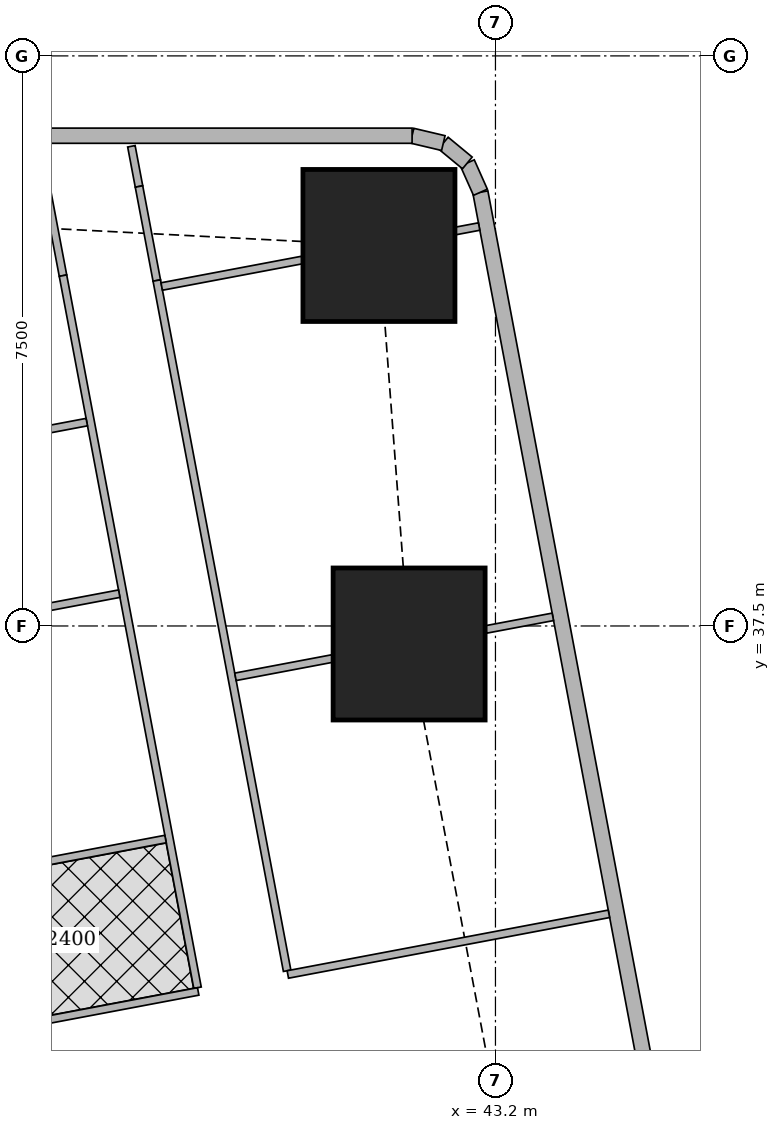
"""IFC4 building model, lengths in metres.
Left out: names, types, materials, properties, quantities, classifications, styles, units other than length and angle.
Written with IfcOpenShell. Run it as: python <this file> out.ifc"""

import sys

from ifc_helpers import new_model, si_unit, direction, frame, frame_2d, origin, origin_2d, place, context, subcontext, project, spatial, rectangle, extrude, element, fill, save


model = new_model("IFC4")
c1 = context("Model", 3, precision=1e-05, world=origin(), true_north=direction((0.0, 1.0)))
c2 = subcontext(c1, "Body", "Model", "MODEL_VIEW")
j1 = project(units=[si_unit("LENGTHUNIT", "METRE"), si_unit("PLANEANGLEUNIT", "RADIAN")], contexts=[c1])
p1 = place(None, origin())
s1 = spatial("IfcSite", under=j1, at=p1, CompositionType="ELEMENT")
p2 = place(p1, origin())
s2 = spatial("IfcBuilding", under=s1, at=p2, CompositionType="ELEMENT")
p3 = place(p2, frame((0.0, 0.0, 274.1)))
s3 = spatial("IfcBuildingStorey", under=s2, at=p3, CompositionType="ELEMENT", Elevation=274.1)
for number, where, z_axis, x_axis in (
    (1, (42.064, 37.263, 0.0), (0.0, 0.0, 1.0), (1.0, 0.0, 0.0)),
    (2, (41.667, 42.506, 0.0), (0.0, 0.0, 1.0), (1.0, 0.0, 0.0)),
):
    element("IfcColumn", number, at=place(p3, frame(where, z_axis=z_axis, x_axis=x_axis)), inside=s3, PredefinedType="COLUMN", context=c2, shape_type="SweptSolid", body=[
        extrude(rectangle(XDim=2.0, YDim=2.0, at=origin_2d()), origin(), (0.0, 0.0, 1.0), 3.75),
    ])
p4 = place(p3, frame((49.684, 7.832, 0.0), z_axis=(0.0, 0.0, 1.0), x_axis=(-0.185616669694, 0.982622232565, 0.0)))
e3 = element("IfcWall", 3, at=p4, inside=s3, PredefinedType="SOLIDWALL", context=c2, shape_type="SweptSolid", body=[
    extrude(rectangle(XDim=36.0, YDim=0.2, at=frame_2d((18.0, 0.0))), origin(), (0.0, 0.0, 1.0), 3.5),
])
p5 = place(p4, frame((2.518, 0.0, 0.9)))
e4 = element("IfcOpeningElement", 4, at=p5, cuts=e3, PredefinedType="OPENING", context=c2, shape_type="SweptSolid", body=[
    extrude(rectangle(XDim=2.4, YDim=1.5, at=frame_2d((1.2, 0.75))), frame((0.0, 0.11, 0.0), z_axis=(0.0, -1.0, 0.0), x_axis=(1.0, 0.0, 0.0)), (0.0, 0.0, 1.0), 0.22),
])
p6 = place(p4, frame((8.444, 0.0, 0.9)))
e5 = element("IfcOpeningElement", 5, at=p6, cuts=e3, PredefinedType="OPENING", context=c2, shape_type="SweptSolid", body=[
    extrude(rectangle(XDim=1.8, YDim=1.5, at=frame_2d((0.9, 0.75))), frame((0.0, 0.11, 0.0), z_axis=(0.0, -1.0, 0.0), x_axis=(1.0, 0.0, 0.0)), (0.0, 0.0, 1.0), 0.22),
])
p7 = place(p4, frame((12.261, 0.0, 0.9)))
e6 = element("IfcOpeningElement", 6, at=p7, cuts=e3, PredefinedType="OPENING", context=c2, shape_type="SweptSolid", body=[
    extrude(rectangle(XDim=1.8, YDim=1.5, at=frame_2d((0.9, 0.75))), frame((0.0, 0.11, 0.0), z_axis=(0.0, -1.0, 0.0), x_axis=(1.0, 0.0, 0.0)), (0.0, 0.0, 1.0), 0.22),
])
p8 = place(p4, frame((16.078, 0.0, 0.9)))
e7 = element("IfcOpeningElement", 7, at=p8, cuts=e3, PredefinedType="OPENING", context=c2, shape_type="SweptSolid", body=[
    extrude(rectangle(XDim=1.8, YDim=1.5, at=frame_2d((0.9, 0.75))), frame((0.0, 0.11, 0.0), z_axis=(0.0, -1.0, 0.0), x_axis=(1.0, 0.0, 0.0)), (0.0, 0.0, 1.0), 0.22),
])
p9 = place(p4, frame((19.894, 0.0, 0.9)))
e8 = element("IfcOpeningElement", 8, at=p9, cuts=e3, PredefinedType="OPENING", context=c2, shape_type="SweptSolid", body=[
    extrude(rectangle(XDim=1.8, YDim=1.5, at=frame_2d((0.9, 0.75))), frame((0.0, 0.11, 0.0), z_axis=(0.0, -1.0, 0.0), x_axis=(1.0, 0.0, 0.0)), (0.0, 0.0, 1.0), 0.22),
])
p10 = place(p4, frame((23.71, 0.0, 0.9)))
e9 = element("IfcOpeningElement", 9, at=p10, cuts=e3, PredefinedType="OPENING", context=c2, shape_type="SweptSolid", body=[
    extrude(rectangle(XDim=1.8, YDim=1.5, at=frame_2d((0.9, 0.75))), frame((0.0, 0.11, 0.0), z_axis=(0.0, -1.0, 0.0), x_axis=(1.0, 0.0, 0.0)), (0.0, 0.0, 1.0), 0.22),
])
p11 = place(p4, frame((27.526, 0.0, 0.9)))
e10 = element("IfcOpeningElement", 10, at=p11, cuts=e3, PredefinedType="OPENING", context=c2, shape_type="SweptSolid", body=[
    extrude(rectangle(XDim=1.8, YDim=1.5, at=frame_2d((0.9, 0.75))), frame((0.0, 0.11, 0.0), z_axis=(0.0, -1.0, 0.0), x_axis=(1.0, 0.0, 0.0)), (0.0, 0.0, 1.0), 0.22),
])
p12 = place(p4, frame((32.046, 0.0, 0.9)))
e11 = element("IfcOpeningElement", 11, at=p12, cuts=e3, PredefinedType="OPENING", context=c2, shape_type="SweptSolid", body=[
    extrude(rectangle(XDim=1.8, YDim=1.5, at=frame_2d((0.9, 0.75))), frame((0.0, 0.11, 0.0), z_axis=(0.0, -1.0, 0.0), x_axis=(1.0, 0.0, 0.0)), (0.0, 0.0, 1.0), 0.22),
])
p13 = place(p3, frame((43.002, 43.206, 0.0), z_axis=(0.0, 0.0, 1.0), x_axis=(-0.40678170573, 0.913525393124, 0.0)))
e12 = element("IfcWall", 12, at=p13, inside=s3, PredefinedType="SOLIDWALL", context=c2, shape_type="SweptSolid", body=[
    extrude(rectangle(XDim=0.423, YDim=0.2, at=frame_2d((0.211, 0.0))), origin(), (0.0, 0.0, 1.0), 3.5),
])
p14 = place(p3, frame((42.83, 43.592, 0.0), z_axis=(0.0, 0.0, 1.0), x_axis=(-0.771190539797, 0.636604391539, 0.0)))
e13 = element("IfcWall", 13, at=p14, inside=s3, PredefinedType="SOLIDWALL", context=c2, shape_type="SweptSolid", body=[
    extrude(rectangle(XDim=0.41, YDim=0.2, at=frame_2d((0.205, 0.0))), origin(), (0.0, 0.0, 1.0), 3.5),
])
p15 = place(p3, frame((42.514, 43.853, 0.0), z_axis=(0.0, 0.0, 1.0), x_axis=(-0.973288080424, 0.229587265555, 0.0)))
e14 = element("IfcWall", 14, at=p15, inside=s3, PredefinedType="SOLIDWALL", context=c2, shape_type="SweptSolid", body=[
    extrude(rectangle(XDim=0.422, YDim=0.2, at=frame_2d((0.211, 0.0))), origin(), (0.0, 0.0, 1.0), 3.5),
])
p16 = place(p3, frame((42.103, 43.95, 0.0), z_axis=(0.0, 0.0, 1.0), x_axis=(-1.0, 0.0, 0.0)))
e15 = element("IfcWall", 15, at=p16, inside=s3, PredefinedType="SOLIDWALL", context=c2, shape_type="SweptSolid", body=[
    extrude(rectangle(XDim=27.54, YDim=0.2, at=frame_2d((13.77, 0.0))), origin(), (0.0, 0.0, 1.0), 3.5),
])
p17 = place(p16, frame((10.603, 0.0, 0.9)))
e16 = element("IfcOpeningElement", 16, at=p17, cuts=e15, PredefinedType="OPENING", context=c2, shape_type="SweptSolid", body=[
    extrude(rectangle(XDim=1.8, YDim=1.5, at=frame_2d((0.9, 0.75))), frame((0.0, 0.11, 0.0), z_axis=(0.0, -1.0, 0.0), x_axis=(1.0, 0.0, 0.0)), (0.0, 0.0, 1.0), 0.22),
])
p18 = place(p16, frame((14.203, 0.0, 0.9)))
e17 = element("IfcOpeningElement", 17, at=p18, cuts=e15, PredefinedType="OPENING", context=c2, shape_type="SweptSolid", body=[
    extrude(rectangle(XDim=1.8, YDim=1.5, at=frame_2d((0.9, 0.75))), frame((0.0, 0.11, 0.0), z_axis=(0.0, -1.0, 0.0), x_axis=(1.0, 0.0, 0.0)), (0.0, 0.0, 1.0), 0.22),
])
p19 = place(p16, frame((17.803, 0.0, 0.9)))
e18 = element("IfcOpeningElement", 18, at=p19, cuts=e15, PredefinedType="OPENING", context=c2, shape_type="SweptSolid", body=[
    extrude(rectangle(XDim=1.8, YDim=1.5, at=frame_2d((0.9, 0.75))), frame((0.0, 0.11, 0.0), z_axis=(0.0, -1.0, 0.0), x_axis=(1.0, 0.0, 0.0)), (0.0, 0.0, 1.0), 0.22),
])
p20 = place(p16, frame((22.822, 0.0, 0.9)))
e19 = element("IfcOpeningElement", 19, at=p20, cuts=e15, PredefinedType="OPENING", context=c2, shape_type="SweptSolid", body=[
    extrude(rectangle(XDim=2.4, YDim=1.5, at=frame_2d((1.2, 0.75))), frame((0.0, 0.11, 0.0), z_axis=(0.0, -1.0, 0.0), x_axis=(1.0, 0.0, 0.0)), (0.0, 0.0, 1.0), 0.22),
])
p21 = place(p3, frame((33.781, 42.186, 0.0), z_axis=(0.0, 0.0, 1.0), x_axis=(0.185593518645, -0.9826266055, 0.0)))
e20 = element("IfcWall", 20, at=p21, inside=s3, PredefinedType="SOLIDWALL", context=c2, shape_type="SweptSolid", body=[
    extrude(rectangle(XDim=35.961, YDim=0.15, at=frame_2d((17.98, 0.0))), origin(), (0.0, 0.0, 1.0), 2.5),
])
p22 = place(p21, frame((11.76, 0.0, 0.0)))
e21 = element("IfcOpeningElement", 21, at=p22, cuts=e20, PredefinedType="OPENING", context=c2, shape_type="SweptSolid", body=[
    extrude(rectangle(XDim=1.0, YDim=2.1, at=frame_2d((0.5, 1.05))), frame((0.0, 0.085, 0.0), z_axis=(0.0, -1.0, 0.0), x_axis=(1.0, 0.0, 0.0)), (0.0, 0.0, 1.0), 0.17),
])
p23 = place(p21, frame((15.576, 0.0, 0.0)))
e22 = element("IfcOpeningElement", 22, at=p23, cuts=e20, PredefinedType="OPENING", context=c2, shape_type="SweptSolid", body=[
    extrude(rectangle(XDim=1.0, YDim=2.1, at=frame_2d((0.5, 1.05))), frame((0.0, 0.085, 0.0), z_axis=(0.0, -1.0, 0.0), x_axis=(1.0, 0.0, 0.0)), (0.0, 0.0, 1.0), 0.17),
])
p24 = place(p21, frame((30.502, 0.0, 0.0)))
e23 = element("IfcOpeningElement", 23, at=p24, cuts=e20, PredefinedType="OPENING", context=c2, shape_type="SweptSolid", body=[
    extrude(rectangle(XDim=1.0, YDim=2.1, at=frame_2d((0.5, 1.05))), frame((0.0, 0.085, 0.0), z_axis=(0.0, -1.0, 0.0), x_axis=(1.0, 0.0, 0.0)), (0.0, 0.0, 1.0), 0.17),
])
p25 = place(p3, frame((38.41, 43.811, 0.0), z_axis=(0.0, 0.0, 1.0), x_axis=(0.185903499302, -0.982568007289, 0.0)))
e24 = element("IfcWall", 24, at=p25, inside=s3, PredefinedType="PARTITIONING", context=c2, shape_type="SweptSolid", body=[
    extrude(rectangle(XDim=0.538, YDim=0.1, at=frame_2d((0.269, 0.0))), origin(), (0.0, 0.0, 1.0), 3.5),
])
p26 = place(p3, frame((38.51, 43.282, 0.0), z_axis=(0.0, 0.0, 1.0), x_axis=(0.185775287495, -0.982592256511, 0.0)))
e25 = element("IfcWall", 25, at=p26, inside=s3, PredefinedType="PARTITIONING", context=c2, shape_type="SweptSolid", body=[
    extrude(rectangle(XDim=1.259, YDim=0.1, at=frame_2d((0.629, 0.0))), origin(), (0.0, 0.0, 1.0), 2.05),
])
p27 = place(p26, frame((0.15, 0.0, 0.0)))
e26 = element("IfcOpeningElement", 26, at=p27, cuts=e25, PredefinedType="OPENING", context=c2, shape_type="SweptSolid", body=[
    extrude(rectangle(XDim=0.9, YDim=2.0, at=frame_2d((0.45, 1.0))), frame((0.0, 0.06, 0.0), z_axis=(0.0, -1.0, 0.0), x_axis=(1.0, 0.0, 0.0)), (0.0, 0.0, 1.0), 0.12),
])
p28 = place(p3, frame((38.744, 42.045, 0.0), z_axis=(0.0, 0.0, 1.0), x_axis=(0.185588352162, -0.982627581305, 0.0)))
e27 = element("IfcWall", 27, at=p28, inside=s3, PredefinedType="PARTITIONING", context=c2, shape_type="SweptSolid", body=[
    extrude(rectangle(XDim=9.241, YDim=0.1, at=frame_2d((4.621, 0.0))), origin(), (0.0, 0.0, 1.0), 3.5),
])
p29 = place(p28, frame((8.191, 0.0, 0.0)))
e28 = element("IfcOpeningElement", 28, at=p29, cuts=e27, PredefinedType="OPENING", context=c2, shape_type="SweptSolid", body=[
    extrude(rectangle(XDim=0.9, YDim=2.1, at=frame_2d((0.45, 1.05))), frame((0.0, 0.06, 0.0), z_axis=(0.0, -1.0, 0.0), x_axis=(1.0, 0.0, 0.0)), (0.0, 0.0, 1.0), 0.12),
])
p30 = place(p28, frame((4.215, 0.0, 0.0)))
e29 = element("IfcOpeningElement", 29, at=p30, cuts=e27, PredefinedType="OPENING", context=c2, shape_type="SweptSolid", body=[
    extrude(rectangle(XDim=0.9, YDim=2.1, at=frame_2d((0.45, 1.05))), frame((0.0, 0.06, 0.0), z_axis=(0.0, -1.0, 0.0), x_axis=(1.0, 0.0, 0.0)), (0.0, 0.0, 1.0), 0.12),
])
p31 = place(p3, frame((37.276, 43.346, 0.0), z_axis=(0.0, 0.0, 1.0), x_axis=(0.185962504646, -0.982556841544, 0.0)))
e30 = element("IfcWall", 30, at=p31, inside=s3, PredefinedType="PARTITIONING", context=c2, shape_type="SweptSolid", body=[
    extrude(rectangle(XDim=1.259, YDim=0.1, at=frame_2d((0.629, 0.0))), origin(), (0.0, 0.0, 1.0), 2.05),
])
p32 = place(p3, frame((37.51, 42.109, 0.0), z_axis=(0.0, 0.0, 1.0), x_axis=(0.185659798122, -0.982614084654, 0.0)))
e31 = element("IfcWall", 31, at=p32, inside=s3, PredefinedType="PARTITIONING", context=c2, shape_type="SweptSolid", body=[
    extrude(rectangle(XDim=9.534, YDim=0.1, at=frame_2d((4.767, 0.0))), origin(), (0.0, 0.0, 1.0), 3.5),
])
p33 = place(p32, frame((8.109, 0.0, 0.0)))
e32 = element("IfcOpeningElement", 32, at=p33, cuts=e31, PredefinedType="OPENING", context=c2, shape_type="SweptSolid", body=[
    extrude(rectangle(XDim=0.9, YDim=2.1, at=frame_2d((0.45, 1.05))), frame((0.0, 0.06, 0.0), z_axis=(0.0, -1.0, 0.0), x_axis=(1.0, 0.0, 0.0)), (0.0, 0.0, 1.0), 0.12),
])
p34 = place(p32, frame((2.65, 0.0, 0.0)))
e33 = element("IfcOpeningElement", 33, at=p34, cuts=e31, PredefinedType="OPENING", context=c2, shape_type="SweptSolid", body=[
    extrude(rectangle(XDim=0.9, YDim=2.1, at=frame_2d((0.45, 1.05))), frame((0.0, 0.06, 0.0), z_axis=(0.0, -1.0, 0.0), x_axis=(1.0, 0.0, 0.0)), (0.0, 0.0, 1.0), 0.12),
])
p35 = place(p32, frame((5.44, 0.0, 0.0)))
e34 = element("IfcOpeningElement", 34, at=p35, cuts=e31, PredefinedType="OPENING", context=c2, shape_type="SweptSolid", body=[
    extrude(rectangle(XDim=0.9, YDim=2.1, at=frame_2d((0.45, 1.05))), frame((0.0, 0.06, 0.0), z_axis=(0.0, -1.0, 0.0), x_axis=(1.0, 0.0, 0.0)), (0.0, 0.0, 1.0), 0.12),
])
p36 = place(p3, frame((42.985, 42.755, 0.0), z_axis=(0.0, 0.0, 1.0), x_axis=(-0.98281924824, -0.184570651215, 0.0)))
e35 = element("IfcWall", 35, at=p36, inside=s3, PredefinedType="PARTITIONING", context=c2, shape_type="SweptSolid", body=[
    extrude(rectangle(XDim=0.313, YDim=0.1, at=frame_2d((0.157, 0.0))), origin(), (0.0, 0.0, 1.0), 3.5),
])
p37 = place(p3, frame((40.657, 42.315, 0.0), z_axis=(0.0, 0.0, 1.0), x_axis=(-0.982640672055, -0.185519027661, 0.0)))
e36 = element("IfcWall", 36, at=p37, inside=s3, PredefinedType="PARTITIONING", context=c2, shape_type="SweptSolid", body=[
    extrude(rectangle(XDim=1.881, YDim=0.1, at=frame_2d((0.94, 0.0))), origin(), (0.0, 0.0, 1.0), 2.05),
])
p38 = place(p3, frame((43.955, 37.62, 0.0), z_axis=(0.0, 0.0, 1.0), x_axis=(-0.982708424405, -0.18515980288, 0.0)))
e37 = element("IfcWall", 37, at=p38, inside=s3, PredefinedType="PARTITIONING", context=c2, shape_type="SweptSolid", body=[
    extrude(rectangle(XDim=0.897, YDim=0.1, at=frame_2d((0.448, 0.0))), origin(), (0.0, 0.0, 1.0), 3.5),
])
p39 = place(p3, frame((41.054, 37.072, 0.0), z_axis=(0.0, 0.0, 1.0), x_axis=(-0.982602741717, -0.185719821156, 0.0)))
e38 = element("IfcWall", 38, at=p39, inside=s3, PredefinedType="PARTITIONING", context=c2, shape_type="SweptSolid", body=[
    extrude(rectangle(XDim=1.297, YDim=0.1, at=frame_2d((0.649, 0.0))), origin(), (0.0, 0.0, 1.0), 3.5),
])
p40 = place(p3, frame((44.693, 33.713, 0.0), z_axis=(0.0, 0.0, 1.0), x_axis=(-0.982633535512, -0.185556823879, 0.0)))
e39 = element("IfcWall", 39, at=p40, inside=s3, PredefinedType="PARTITIONING", context=c2, shape_type="SweptSolid", body=[
    extrude(rectangle(XDim=4.3, YDim=0.1, at=frame_2d((2.15, 0.0))), origin(), (0.0, 0.0, 1.0), 2.5),
])
p41 = place(p3, frame((37.823, 40.182, 0.0), z_axis=(0.0, 0.0, 1.0), x_axis=(-0.98263926043, -0.185526504472, 0.0)))
e40 = element("IfcWall", 40, at=p41, inside=s3, PredefinedType="PARTITIONING", context=c2, shape_type="SweptSolid", body=[
    extrude(rectangle(XDim=3.524, YDim=0.1, at=frame_2d((1.762, 0.0))), origin(), (0.0, 0.0, 1.0), 3.5),
])
p42 = place(p3, frame((38.25, 37.925, 0.0), z_axis=(0.0, 0.0, 1.0), x_axis=(-0.982610209589, -0.185680305934, 0.0)))
e41 = element("IfcWall", 41, at=p42, inside=s3, PredefinedType="PARTITIONING", context=c2, shape_type="SweptSolid", body=[
    extrude(rectangle(XDim=1.567, YDim=0.1, at=frame_2d((0.784, 0.0))), origin(), (0.0, 0.0, 1.0), 3.5),
])
p43 = place(p3, frame((39.289, 32.692, 0.0), z_axis=(0.0, 0.0, 1.0), x_axis=(-0.982662827464, -0.185401638399, 0.0)))
e42 = element("IfcWall", 42, at=p43, inside=s3, PredefinedType="PARTITIONING", context=c2, shape_type="SweptSolid", body=[
    extrude(rectangle(XDim=3.575, YDim=0.1, at=frame_2d((1.788, 0.0))), origin(), (0.0, 0.0, 1.0), 3.5),
])
p44 = place(p3, frame((38.859, 34.697, 0.0), z_axis=(0.0, 0.0, 1.0), x_axis=(-0.982626628545, -0.185593396635, 0.0)))
e43 = element("IfcWall", 43, at=p44, inside=s3, PredefinedType="PARTITIONING", context=c2, shape_type="SweptSolid", body=[
    extrude(rectangle(XDim=3.524, YDim=0.1, at=frame_2d((1.762, 0.0))), origin(), (0.0, 0.0, 1.0), 3.5),
])
p45 = place(p3, frame((37.947, 10.163, 0.0), z_axis=(0.0, 0.0, 1.0), x_axis=(-0.185572770922, 0.982630523998, 0.0)))
e44 = element("IfcWall", 44, at=p45, inside=s3, PredefinedType="PARTITIONING", context=c2, shape_type="SweptSolid", body=[
    extrude(rectangle(XDim=25.111, YDim=0.125, at=frame_2d((12.556, 0.0))), origin(), (0.0, 0.0, 1.0), 2.5),
])
p46 = place(p45, frame((0.708, 0.0, 0.0)))
e45 = element("IfcOpeningElement", 45, at=p46, cuts=e44, PredefinedType="OPENING", context=c2, shape_type="SweptSolid", body=[
    extrude(rectangle(XDim=1.0, YDim=2.1, at=frame_2d((0.5, 1.05))), frame((0.0, 0.073, 0.0), z_axis=(0.0, -1.0, 0.0), x_axis=(1.0, 0.0, 0.0)), (0.0, 0.0, 1.0), 0.145),
])
p47 = place(p45, frame((5.9, 0.0, 0.0)))
e46 = element("IfcOpeningElement", 46, at=p47, cuts=e44, PredefinedType="OPENING", context=c2, shape_type="SweptSolid", body=[
    extrude(rectangle(XDim=1.0, YDim=2.1, at=frame_2d((0.5, 1.05))), frame((0.0, 0.073, 0.0), z_axis=(0.0, -1.0, 0.0), x_axis=(1.0, 0.0, 0.0)), (0.0, 0.0, 1.0), 0.145),
])
p48 = place(p45, frame((13.378, 0.0, 0.0)))
e47 = element("IfcOpeningElement", 47, at=p48, cuts=e44, PredefinedType="OPENING", context=c2, shape_type="SweptSolid", body=[
    extrude(rectangle(XDim=1.0, YDim=2.1, at=frame_2d((0.5, 1.05))), frame((0.0, 0.073, 0.0), z_axis=(0.0, -1.0, 0.0), x_axis=(1.0, 0.0, 0.0)), (0.0, 0.0, 1.0), 0.145),
])
p49 = place(p45, frame((21.15, 0.0, 0.0)))
e48 = element("IfcOpeningElement", 48, at=p49, cuts=e44, PredefinedType="OPENING", context=c2, shape_type="SweptSolid", body=[
    extrude(rectangle(XDim=1.0, YDim=2.1, at=frame_2d((0.5, 1.05))), frame((0.0, 0.073, 0.0), z_axis=(0.0, -1.0, 0.0), x_axis=(1.0, 0.0, 0.0)), (0.0, 0.0, 1.0), 0.145),
])
p50 = place(p10, origin())
e49 = element("IfcWindow", 49, at=p50, inside=s3, PartitioningType="SINGLE_PANEL", PredefinedType="WINDOW", context=c2, shape_type="SweptSolid", body=[
    extrude(rectangle(XDim=1.8, YDim=1.5, at=frame_2d((0.9, 0.75))), frame((0.0, 0.03, 0.0), z_axis=(0.0, -1.0, 0.0), x_axis=(1.0, 0.0, 0.0)), (0.0, 0.0, 1.0), 0.06),
])
fill(e9, e49)
p51 = place(p11, origin())
e50 = element("IfcWindow", 50, at=p51, inside=s3, PartitioningType="SINGLE_PANEL", PredefinedType="WINDOW", context=c2, shape_type="SweptSolid", body=[
    extrude(rectangle(XDim=1.8, YDim=1.5, at=frame_2d((0.9, 0.75))), frame((0.0, 0.03, 0.0), z_axis=(0.0, -1.0, 0.0), x_axis=(1.0, 0.0, 0.0)), (0.0, 0.0, 1.0), 0.06),
])
fill(e10, e50)
p52 = place(p12, origin())
e51 = element("IfcWindow", 51, at=p52, inside=s3, PartitioningType="SINGLE_PANEL", PredefinedType="WINDOW", context=c2, shape_type="SweptSolid", body=[
    extrude(rectangle(XDim=1.8, YDim=1.5, at=frame_2d((0.9, 0.75))), frame((0.0, 0.03, 0.0), z_axis=(0.0, -1.0, 0.0), x_axis=(1.0, 0.0, 0.0)), (0.0, 0.0, 1.0), 0.06),
])
fill(e11, e51)
p53 = place(p27, origin())
e52 = element("IfcDoor", 52, at=p53, inside=s3, OperationType="SINGLE_SWING_LEFT", PredefinedType="DOOR", context=c2, shape_type="SweptSolid", body=[
    extrude(rectangle(XDim=0.9, YDim=2.0, at=frame_2d((0.45, 1.0))), frame((0.0, 0.025, 0.0), z_axis=(0.0, -1.0, 0.0), x_axis=(1.0, 0.0, 0.0)), (0.0, 0.0, 1.0), 0.05),
])
fill(e26, e52)
p54 = place(p29, origin())
e53 = element("IfcDoor", 53, at=p54, inside=s3, OperationType="SINGLE_SWING_RIGHT", PredefinedType="DOOR", context=c2, shape_type="SweptSolid", body=[
    extrude(rectangle(XDim=0.9, YDim=2.1, at=frame_2d((0.45, 1.05))), frame((0.0, 0.025, 0.0), z_axis=(0.0, -1.0, 0.0), x_axis=(1.0, 0.0, 0.0)), (0.0, 0.0, 1.0), 0.05),
])
fill(e28, e53)
p55 = place(p30, origin())
e54 = element("IfcDoor", 54, at=p55, inside=s3, OperationType="SINGLE_SWING_RIGHT", PredefinedType="DOOR", context=c2, shape_type="SweptSolid", body=[
    extrude(rectangle(XDim=0.9, YDim=2.1, at=frame_2d((0.45, 1.05))), frame((0.0, 0.025, 0.0), z_axis=(0.0, -1.0, 0.0), x_axis=(1.0, 0.0, 0.0)), (0.0, 0.0, 1.0), 0.05),
])
fill(e29, e54)
p56 = place(p33, origin())
e55 = element("IfcDoor", 55, at=p56, inside=s3, OperationType="SINGLE_SWING_LEFT", PredefinedType="DOOR", context=c2, shape_type="SweptSolid", body=[
    extrude(rectangle(XDim=0.9, YDim=2.1, at=frame_2d((0.45, 1.05))), frame((0.0, 0.025, 0.0), z_axis=(0.0, -1.0, 0.0), x_axis=(1.0, 0.0, 0.0)), (0.0, 0.0, 1.0), 0.05),
])
fill(e32, e55)
p57 = place(p34, origin())
e56 = element("IfcDoor", 56, at=p57, inside=s3, OperationType="SINGLE_SWING_RIGHT", PredefinedType="DOOR", context=c2, shape_type="SweptSolid", body=[
    extrude(rectangle(XDim=0.9, YDim=2.1, at=frame_2d((0.45, 1.05))), frame((0.0, 0.025, 0.0), z_axis=(0.0, -1.0, 0.0), x_axis=(1.0, 0.0, 0.0)), (0.0, 0.0, 1.0), 0.05),
])
fill(e33, e56)
p58 = place(p35, origin())
e57 = element("IfcDoor", 57, at=p58, inside=s3, OperationType="SINGLE_SWING_RIGHT", PredefinedType="DOOR", context=c2, shape_type="SweptSolid", body=[
    extrude(rectangle(XDim=0.9, YDim=2.1, at=frame_2d((0.45, 1.05))), frame((0.0, 0.025, 0.0), z_axis=(0.0, -1.0, 0.0), x_axis=(1.0, 0.0, 0.0)), (0.0, 0.0, 1.0), 0.05),
])
fill(e34, e57)
save(model, sys.argv[1])
